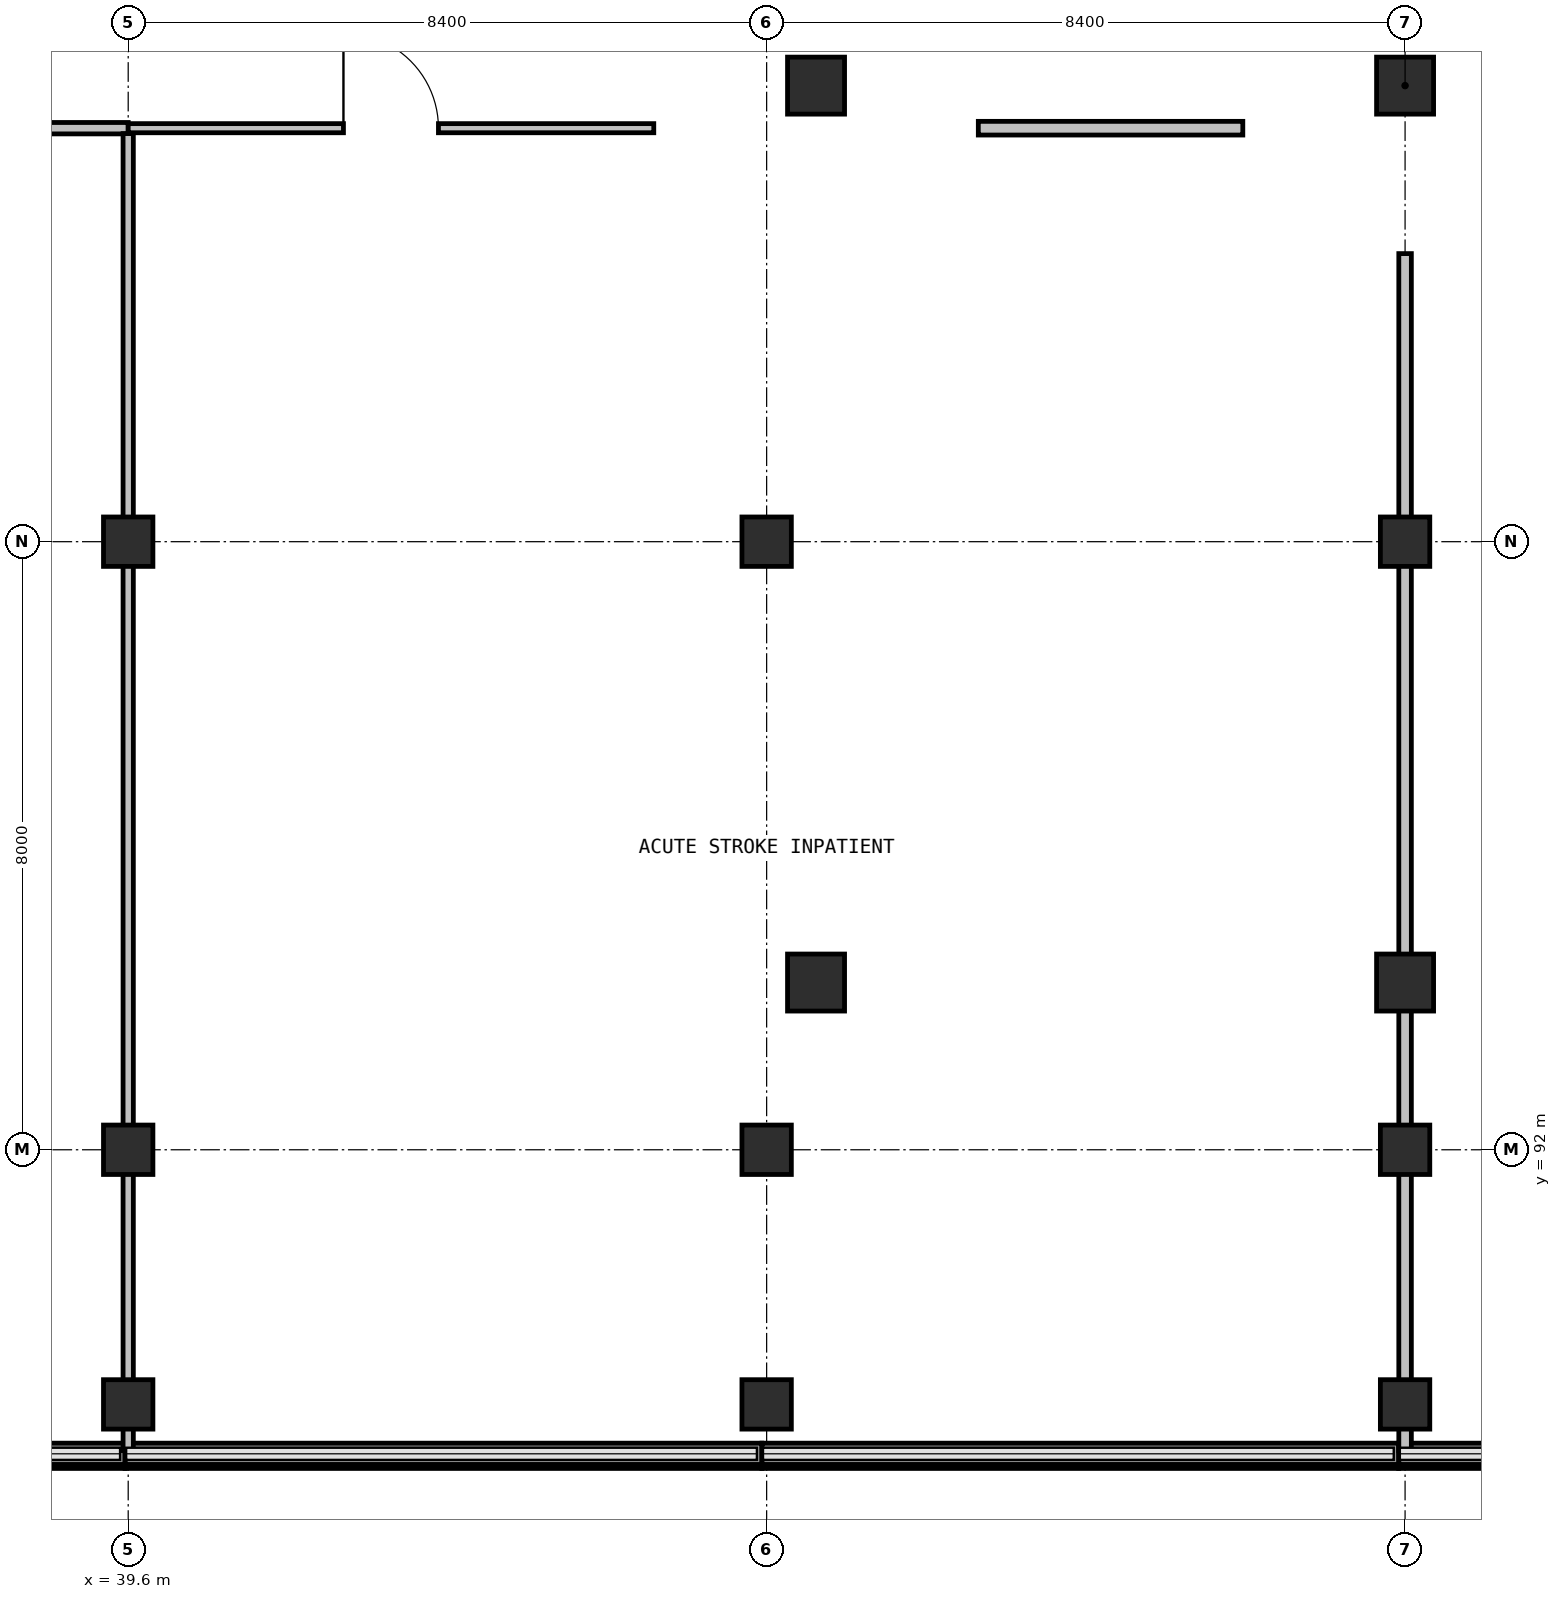
"""IFC4 building model, lengths in metres.
Left out: names, types, materials, properties, quantities, classifications, styles, units other than length and angle.
Written with IfcOpenShell. Run it as: python <this file> out.ifc"""

import sys

from ifc_helpers import new_model, si_unit, direction, frame, frame_2d, origin, origin_2d, place, context, subcontext, project, spatial, rectangle, extrude, element, fill, save


model = new_model("IFC4")
c1 = context("Model", 3, precision=1e-05, world=origin(), true_north=direction((0.0, 1.0)))
c2 = subcontext(c1, "Body", "Model", "MODEL_VIEW")
j1 = project(units=[si_unit("LENGTHUNIT", "METRE"), si_unit("PLANEANGLEUNIT", "RADIAN")], contexts=[c1])
p1 = place(None, origin())
s1 = spatial("IfcSite", under=j1, at=p1, CompositionType="ELEMENT")
p2 = place(p1, origin())
s2 = spatial("IfcBuilding", under=s1, at=p2, CompositionType="ELEMENT")
p3 = place(p2, frame((0.0, 0.0, 27.3)))
s3 = spatial("IfcBuildingStorey", under=s2, at=p3, CompositionType="ELEMENT", Elevation=27.3)
for number, where, z_axis, x_axis in (
    (1, (48.65, 94.2, 0.0), (0.0, 0.0, 1.0), (1.0, 0.0, 0.0)),
    (2, (56.4, 94.2, 0.0), (0.0, 0.0, 1.0), (1.0, 0.0, 0.0)),
    (3, (48.65, 106.0, 0.0), (0.0, 0.0, 1.0), (1.0, 0.0, 0.0)),
    (4, (56.4, 106.0, 0.0), (0.0, 0.0, 1.0), (1.0, 0.0, 0.0)),
):
    element("IfcColumn", number, at=place(p3, frame(where, z_axis=z_axis, x_axis=x_axis)), inside=s3, PredefinedType="COLUMN", context=c2, shape_type="SweptSolid", body=[
        extrude(rectangle(XDim=0.75, YDim=0.75, at=origin_2d()), origin(), (0.0, 0.0, 1.0), 4.05),
    ])
for number, where, z_axis, x_axis in (
    (5, (39.6, 88.65, 0.0), (0.0, 0.0, 1.0), (1.0, 0.0, 0.0)),
    (6, (39.6, 92.0, 0.0), (0.0, 0.0, 1.0), (1.0, 0.0, 0.0)),
    (7, (39.6, 100.0, 0.0), (0.0, 0.0, 1.0), (1.0, 0.0, 0.0)),
    (8, (48.0, 88.65, 0.0), (0.0, 0.0, 1.0), (1.0, 0.0, 0.0)),
    (9, (48.0, 92.0, 0.0), (0.0, 0.0, 1.0), (1.0, 0.0, 0.0)),
    (10, (48.0, 100.0, 0.0), (0.0, 0.0, 1.0), (1.0, 0.0, 0.0)),
    (11, (56.4, 88.65, 0.0), (0.0, 0.0, 1.0), (1.0, 0.0, 0.0)),
    (12, (56.4, 92.0, 0.0), (0.0, 0.0, 1.0), (1.0, 0.0, 0.0)),
    (13, (56.4, 100.0, 0.0), (0.0, 0.0, 1.0), (1.0, 0.0, 0.0)),
):
    element("IfcColumn", number, at=place(p3, frame(where, z_axis=z_axis, x_axis=x_axis)), inside=s3, PredefinedType="COLUMN", context=c2, shape_type="SweptSolid", body=[
        extrude(rectangle(XDim=0.65, YDim=0.65, at=origin_2d()), origin(), (0.0, 0.0, 1.0), 4.05),
    ])
for number, where, z_axis, x_axis in (
    (14, (64.693, 88.0, 0.0), (0.0, 0.0, 1.0), (-1.0, 0.0, 0.0)),
    (15, (56.314, 88.0, 0.0), (0.0, 0.0, 1.0), (-1.0, 0.0, 0.0)),
    (16, (47.935, 88.0, 0.0), (0.0, 0.0, 1.0), (-1.0, 0.0, 0.0)),
    (17, (39.556, 88.0, 0.0), (0.0, 0.0, 1.0), (-1.0, 0.0, 0.0)),
):
    element("IfcWall", number, at=place(p3, frame(where, z_axis=z_axis, x_axis=x_axis)), inside=s3, PredefinedType="SOLIDWALL", context=c2, shape_type="SweptSolid", body=[
        extrude(rectangle(XDim=8.375, YDim=0.28, at=frame_2d((4.188, 0.0))), origin(), (0.0, 0.0, 1.0), 0.94),
    ])
p4 = place(p3, frame((31.2, 105.44, 0.0), z_axis=(0.0, 0.0, 1.0), x_axis=(1.0, 0.0, 0.0)))
e18 = element("IfcWall", 18, at=p4, inside=s3, PredefinedType="PARTITIONING", context=c2, shape_type="SweptSolid", body=[
    extrude(rectangle(XDim=8.4, YDim=0.15, at=frame_2d((4.2, 0.0))), origin(), (0.0, 0.0, 1.0), 3.78),
])
p5 = place(p4, frame((3.675, 0.0, 0.0)))
e19 = element("IfcOpeningElement", 19, at=p5, cuts=e18, PredefinedType="OPENING", context=c2, shape_type="SweptSolid", body=[
    extrude(rectangle(XDim=1.05, YDim=2.15, at=frame_2d((0.525, 1.075))), frame((0.0, 0.085, 0.0), z_axis=(0.0, -1.0, 0.0), x_axis=(1.0, 0.0, 0.0)), (0.0, 0.0, 1.0), 0.17),
])
p6 = place(p3, frame((39.6, 105.369, 0.0), z_axis=(0.0, 0.0, 1.0), x_axis=(0.0, -1.0, 0.0)))
e20 = element("IfcWall", 20, at=p6, inside=s3, PredefinedType="PARTITIONING", context=c2, shape_type="SweptSolid", body=[
    extrude(rectangle(XDim=17.327, YDim=0.135, at=frame_2d((8.664, 0.0))), origin(), (0.0, 0.0, 1.0), 3.18),
])
p7 = place(p3, frame((39.6, 105.44, 0.0), z_axis=(0.0, 0.0, 1.0), x_axis=(1.0, 0.0, 0.0)))
e21 = element("IfcWall", 21, at=p7, inside=s3, PredefinedType="PARTITIONING", context=c2, shape_type="SweptSolid", body=[
    extrude(rectangle(XDim=6.915, YDim=0.12, at=frame_2d((3.458, 0.0))), origin(), (0.0, 0.0, 1.0), 3.78),
])
p8 = place(p7, frame((2.832, 0.0, 0.0)))
e22 = element("IfcOpeningElement", 22, at=p8, cuts=e21, PredefinedType="OPENING", context=c2, shape_type="SweptSolid", body=[
    extrude(rectangle(XDim=1.25, YDim=2.15, at=frame_2d((0.625, 1.075))), frame((0.0, 0.07, 0.0), z_axis=(0.0, -1.0, 0.0), x_axis=(1.0, 0.0, 0.0)), (0.0, 0.0, 1.0), 0.14),
])
p9 = place(p3, frame((50.785, 105.44, 0.0), z_axis=(0.0, 0.0, 1.0), x_axis=(1.0, 0.0, 0.0)))
e23 = element("IfcWall", 23, at=p9, inside=s3, PredefinedType="PARTITIONING", context=c2, shape_type="SweptSolid", body=[
    extrude(rectangle(XDim=3.48, YDim=0.18, at=frame_2d((1.74, 0.0))), origin(), (0.0, 0.0, 1.0), 3.78),
])
p10 = place(p3, frame((56.4, 103.79, 0.0), z_axis=(0.0, 0.0, 1.0), x_axis=(0.0, -1.0, 0.0)))
e24 = element("IfcWall", 24, at=p10, inside=s3, PredefinedType="PARTITIONING", context=c2, shape_type="SweptSolid", body=[
    extrude(rectangle(XDim=15.748, YDim=0.165, at=frame_2d((7.874, 0.0))), origin(), (0.0, 0.0, 1.0), 3.18),
])
p11 = place(p8, origin())
e25 = element("IfcDoor", 25, at=p11, inside=s3, OperationType="SINGLE_SWING_RIGHT", PredefinedType="DOOR", context=c2, shape_type="SweptSolid", body=[
    extrude(rectangle(XDim=1.25, YDim=2.15, at=frame_2d((0.625, 1.075))), frame((0.0, 0.025, 0.0), z_axis=(0.0, -1.0, 0.0), x_axis=(1.0, 0.0, 0.0)), (0.0, 0.0, 1.0), 0.05),
])
fill(e22, e25)
save(model, sys.argv[1])
